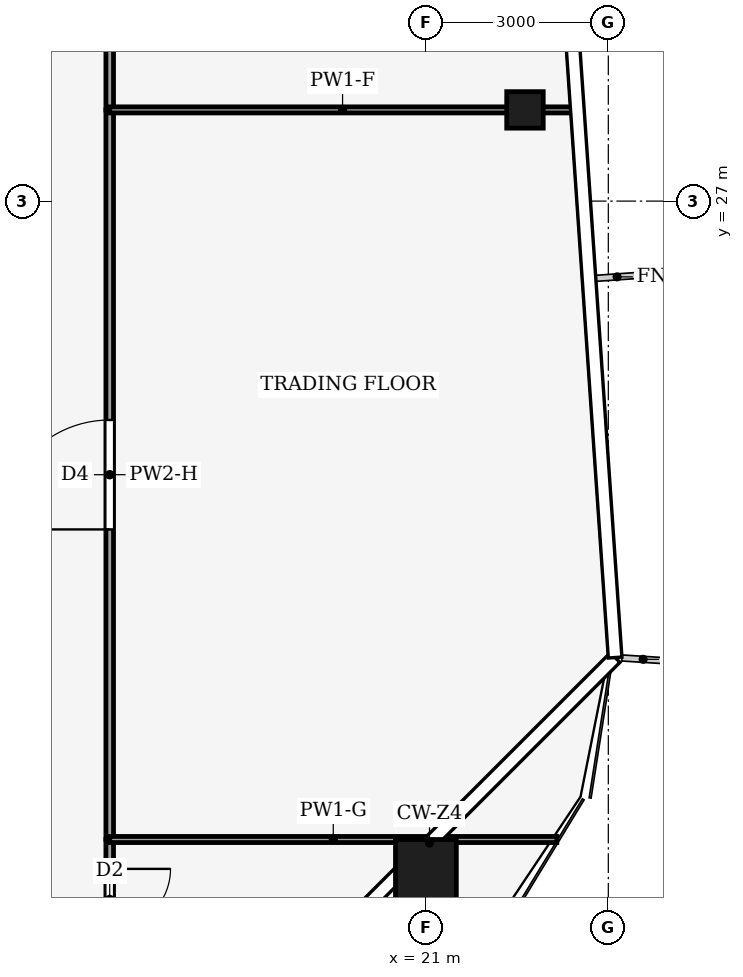
"""IFC4 building model, lengths in metres.
Left out: names, types, materials, properties, quantities, classifications, styles, units other than length and angle.
Written with IfcOpenShell. Run it as: python <this file> out.ifc"""

import sys

from ifc_helpers import new_model, si_unit, direction, frame, frame_2d, origin, origin_2d, place, context, subcontext, project, spatial, rectangle, hollow_rectangle, extrude, element, fill, save


model = new_model("IFC4")
c1 = context("Model", 3, precision=1e-05, world=origin(), true_north=direction((0.0, 1.0)))
c2 = subcontext(c1, "Body", "Model", "MODEL_VIEW")
j1 = project(units=[si_unit("LENGTHUNIT", "METRE"), si_unit("PLANEANGLEUNIT", "RADIAN")], contexts=[c1])
p1 = place(None, origin())
s1 = spatial("IfcSite", under=j1, at=p1, CompositionType="ELEMENT")
p2 = place(p1, origin())
s2 = spatial("IfcBuilding", under=s1, at=p2, CompositionType="ELEMENT")
p3 = place(p2, frame((0.0, 0.0, 250.0)))
s3 = spatial("IfcBuildingStorey", under=s2, at=p3, CompositionType="ELEMENT", Elevation=250.0)
p4 = place(p3, frame((21.0, 16.0, 0.0), z_axis=(0.0, 0.0, 1.0), x_axis=(1.0, 0.0, 0.0)))
e1 = element("IfcColumn", 1, at=p4, inside=s3, PredefinedType="COLUMN", context=c2, shape_type="SweptSolid", body=[
    extrude(hollow_rectangle(XDim=1.0, YDim=1.0, WallThickness=0.045, at=origin_2d()), origin(), (0.0, 0.0, 1.0), 4.0),
])
p5 = place(p3, frame((22.629, 28.5, 0.0), z_axis=(0.0, 0.0, 1.0), x_axis=(1.0, 0.0, 0.0)))
e2 = element("IfcColumn", 2, at=p5, inside=s3, PredefinedType="COLUMN", context=c2, shape_type="SweptSolid", body=[
    extrude(hollow_rectangle(XDim=0.6, YDim=0.6, WallThickness=0.025, at=origin_2d()), origin(), (0.0, 0.0, 1.0), 4.0),
])
p6 = place(p3, frame((15.8, 16.5, 0.0), z_axis=(0.0, 0.0, 1.0), x_axis=(0.0, -1.0, 0.0)))
e3 = element("IfcWall", 3, at=p6, inside=s3, PredefinedType="PARTITIONING", context=c2, shape_type="SweptSolid", body=[
    extrude(rectangle(XDim=2.897, YDim=0.125, at=frame_2d((1.448, 0.0))), origin(), (0.0, 0.0, 1.0), 3.04),
])
p7 = place(p6, frame((0.483, 0.0, 0.0)))
e4 = element("IfcOpeningElement", 4, at=p7, cuts=e3, PredefinedType="OPENING", context=c2, shape_type="SweptSolid", body=[
    extrude(rectangle(XDim=1.0, YDim=2.1, at=frame_2d((0.5, 1.05))), frame((0.0, 0.073, 0.0), z_axis=(0.0, -1.0, 0.0), x_axis=(1.0, 0.0, 0.0)), (0.0, 0.0, 1.0), 0.145),
])
p8 = place(p3, frame((15.8, 16.5, 0.0), z_axis=(0.0, 0.0, 1.0), x_axis=(0.0, 1.0, 0.0)))
e5 = element("IfcWall", 5, at=p8, inside=s3, PredefinedType="PARTITIONING", context=c2, shape_type="SweptSolid", body=[
    extrude(rectangle(XDim=12.0, YDim=0.125, at=frame_2d((6.0, 0.0))), origin(), (0.0, 0.0, 1.0), 3.14),
])
p9 = place(p8, frame((5.1, 0.0, 0.0)))
e6 = element("IfcOpeningElement", 6, at=p9, cuts=e5, PredefinedType="OPENING", context=c2, shape_type="SweptSolid", body=[
    extrude(rectangle(XDim=1.8, YDim=2.1, at=frame_2d((0.9, 1.05))), frame((0.0, 0.073, 0.0), z_axis=(0.0, -1.0, 0.0), x_axis=(1.0, 0.0, 0.0)), (0.0, 0.0, 1.0), 0.145),
])
p10 = place(p3, frame((15.8, 40.5, 0.0), z_axis=(0.0, 0.0, 1.0), x_axis=(0.0, -1.0, 0.0)))
e7 = element("IfcWall", 7, at=p10, inside=s3, PredefinedType="PARTITIONING", context=c2, shape_type="SweptSolid", body=[
    extrude(rectangle(XDim=12.0, YDim=0.125, at=frame_2d((6.0, 0.0))), origin(), (0.0, 0.0, 1.0), 3.14),
])
p11 = place(p10, frame((5.5, 0.0, 0.0)))
e8 = element("IfcOpeningElement", 8, at=p11, cuts=e7, PredefinedType="OPENING", context=c2, shape_type="SweptSolid", body=[
    extrude(rectangle(XDim=1.0, YDim=2.1, at=frame_2d((0.5, 1.05))), frame((0.0, 0.073, 0.0), z_axis=(0.0, -1.0, 0.0), x_axis=(1.0, 0.0, 0.0)), (0.0, 0.0, 1.0), 0.145),
])
p12 = place(p3, frame((23.153, 16.5, 0.0), z_axis=(0.0, 0.0, 1.0), x_axis=(-1.0, 0.0, 0.0)))
e9 = element("IfcWall", 9, at=p12, inside=s3, PredefinedType="PARTITIONING", context=c2, shape_type="SweptSolid", body=[
    extrude(rectangle(XDim=7.353, YDim=0.1, at=frame_2d((3.676, 0.0))), origin(), (0.0, 0.0, 1.0), 2.93),
])
p13 = place(p3, frame((23.459, 28.5, 0.0), z_axis=(0.0, 0.0, 1.0), x_axis=(-1.0, 0.0, 0.0)))
e10 = element("IfcWall", 10, at=p13, inside=s3, PredefinedType="PARTITIONING", context=c2, shape_type="SweptSolid", body=[
    extrude(rectangle(XDim=7.659, YDim=0.1, at=frame_2d((3.83, 0.0))), origin(), (0.0, 0.0, 1.0), 3.04),
])
p14 = place(p7, origin())
e11 = element("IfcDoor", 11, at=p14, inside=s3, OperationType="SINGLE_SWING_LEFT", PredefinedType="DOOR", context=c2, shape_type="SweptSolid", body=[
    extrude(rectangle(XDim=1.0, YDim=2.1, at=frame_2d((0.5, 1.05))), frame((0.0, 0.025, 0.0), z_axis=(0.0, -1.0, 0.0), x_axis=(1.0, 0.0, 0.0)), (0.0, 0.0, 1.0), 0.05),
])
fill(e4, e11)
p15 = place(p9, origin())
e12 = element("IfcDoor", 12, at=p15, inside=s3, OperationType="DOUBLE_DOOR_SINGLE_SWING", PredefinedType="DOOR", context=c2, shape_type="SweptSolid", body=[
    extrude(rectangle(XDim=1.8, YDim=2.1, at=frame_2d((0.9, 1.05))), frame((0.0, 0.025, 0.0), z_axis=(0.0, -1.0, 0.0), x_axis=(1.0, 0.0, 0.0)), (0.0, 0.0, 1.0), 0.05),
])
fill(e6, e12)
save(model, sys.argv[1])
